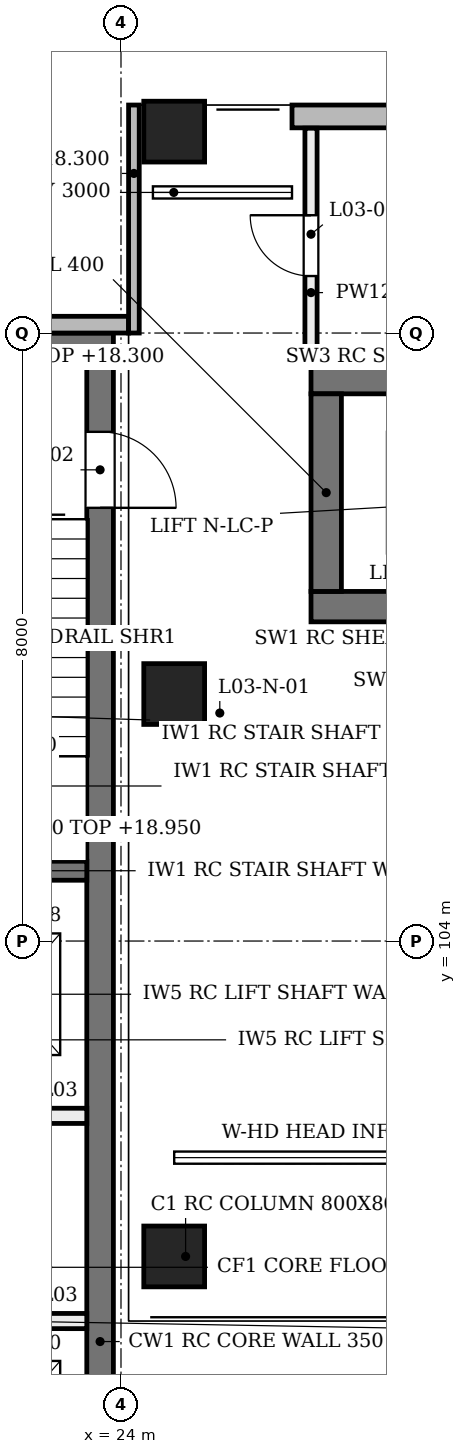
"""IFC4 building model, lengths in metres.
Left out: names, types, materials, properties, quantities, classifications, styles, units other than length and angle.
Written with IfcOpenShell. Run it as: python <this file> out.ifc"""

import sys

from ifc_helpers import new_model, si_unit, direction, frame, frame_2d, origin, origin_2d, place, context, subcontext, project, spatial, rectangle, extrude, element, fill, save


model = new_model("IFC4")
c1 = context("Model", 3, precision=1e-05, world=origin(), true_north=direction((0.0, 1.0)))
c2 = subcontext(c1, "Body", "Model", "MODEL_VIEW")
j1 = project(units=[si_unit("LENGTHUNIT", "METRE"), si_unit("PLANEANGLEUNIT", "RADIAN")], contexts=[c1])
p1 = place(None, origin())
s1 = spatial("IfcSite", under=j1, at=p1, CompositionType="ELEMENT")
p2 = place(p1, origin())
s2 = spatial("IfcBuilding", under=s1, at=p2, CompositionType="ELEMENT")
p3 = place(p2, frame((0.0, 0.0, 14.4)))
s3 = spatial("IfcBuildingStorey", under=s2, at=p3, CompositionType="ELEMENT", Elevation=14.4)
p4 = place(p3, frame((26.5, 108.4, 0.0), z_axis=(0.0, 0.0, 1.0), x_axis=(1.0, 0.0, 0.0)))
e1 = element("IfcWall", 1, at=p4, inside=s3, PredefinedType="SHEAR", context=c2, shape_type="SweptSolid", body=[
    extrude(rectangle(XDim=6.5, YDim=0.4, at=frame_2d((3.25, 0.0))), origin(), (0.0, 0.0, 1.0), 4.58),
])
p5 = place(p4, frame((1.15, 0.0, 0.0)))
e2 = element("IfcOpeningElement", 2, at=p5, cuts=e1, PredefinedType="OPENING", context=c2, shape_type="SweptSolid", body=[
    extrude(rectangle(XDim=1.1, YDim=2.1, at=frame_2d((0.55, 1.05))), frame((0.0, 0.21, 0.0), z_axis=(0.0, -1.0, 0.0), x_axis=(1.0, 0.0, 0.0)), (0.0, 0.0, 1.0), 0.42),
])
p6 = place(p4, frame((3.75, 0.0, 0.0)))
e3 = element("IfcOpeningElement", 3, at=p6, cuts=e1, PredefinedType="OPENING", context=c2, shape_type="SweptSolid", body=[
    extrude(rectangle(XDim=1.1, YDim=2.1, at=frame_2d((0.55, 1.05))), frame((0.0, 0.21, 0.0), z_axis=(0.0, -1.0, 0.0), x_axis=(1.0, 0.0, 0.0)), (0.0, 0.0, 1.0), 0.42),
])
p7 = place(p3, frame((26.5, 111.4, 0.0), z_axis=(0.0, 0.0, 1.0), x_axis=(1.0, 0.0, 0.0)))
e4 = element("IfcWall", 4, at=p7, inside=s3, PredefinedType="SHEAR", context=c2, shape_type="SweptSolid", body=[
    extrude(rectangle(XDim=6.5, YDim=0.4, at=frame_2d((3.25, 0.0))), origin(), (0.0, 0.0, 1.0), 4.58),
])
p8 = place(p3, frame((26.7, 108.6, 0.0), z_axis=(0.0, 0.0, 1.0), x_axis=(0.0, 1.0, 0.0)))
e5 = element("IfcWall", 5, at=p8, inside=s3, PredefinedType="SHEAR", context=c2, shape_type="SweptSolid", body=[
    extrude(rectangle(XDim=2.6, YDim=0.4, at=frame_2d((1.3, 0.0))), origin(), (0.0, 0.0, 1.0), 4.58),
])
p9 = place(p3, frame((15.95, 111.825, 0.0), z_axis=(0.0, 0.0, 1.0), x_axis=(1.0, 0.0, 0.0)))
e6 = element("IfcWall", 6, at=p9, inside=s3, PredefinedType="SHEAR", context=c2, shape_type="SweptSolid", body=[
    extrude(rectangle(XDim=7.95, YDim=0.35, at=frame_2d((3.975, 0.0))), origin(), (0.0, 0.0, 1.0), 4.58),
])
p10 = place(p3, frame((23.725, 96.45, 0.0), z_axis=(0.0, 0.0, 1.0), x_axis=(0.0, 1.0, 0.0)))
e7 = element("IfcWall", 7, at=p10, inside=s3, PredefinedType="SHEAR", context=c2, shape_type="SweptSolid", body=[
    extrude(rectangle(XDim=15.2, YDim=0.35, at=frame_2d((7.6, 0.0))), origin(), (0.0, 0.0, 1.0), 4.58),
])
p11 = place(p10, frame((13.25, 0.0, 0.0)))
e8 = element("IfcOpeningElement", 8, at=p11, cuts=e7, PredefinedType="OPENING", context=c2, shape_type="SweptSolid", body=[
    extrude(rectangle(XDim=1.0, YDim=2.1, at=frame_2d((0.5, 1.05))), frame((0.0, 0.185, 0.0), z_axis=(0.0, -1.0, 0.0), x_axis=(1.0, 0.0, 0.0)), (0.0, 0.0, 1.0), 0.37),
])
for number, where, z_axis, x_axis in (
    (9, (24.7, 99.6, 0.0), (0.0, 0.204, 0.979), (-1.0, 0.0, 0.0)),
    (10, (24.7, 107.0, 0.0), (0.0, 0.204, 0.979), (-1.0, 0.0, 0.0)),
    (11, (24.7, 114.4, 0.0), (0.0, 0.204, 0.979), (-1.0, 0.0, 0.0)),
):
    element("IfcColumn", number, at=place(p3, frame(where, z_axis=z_axis, x_axis=x_axis)), inside=s3, PredefinedType="COLUMN", context=c2, shape_type="SweptSolid", body=[
        extrude(rectangle(XDim=0.8, YDim=0.8, at=origin_2d()), origin(), (0.0, 0.0, 1.0), 4.903),
    ])
p12 = place(p3, frame((26.25, 114.85, 0.0), z_axis=(0.0, 0.0, 1.0), x_axis=(1.0, 0.0, 0.0)))
e12 = element("IfcWall", 12, at=p12, inside=s3, PredefinedType="SOLIDWALL", context=c2, shape_type="SweptSolid", body=[
    extrude(rectangle(XDim=20.0, YDim=0.3, at=frame_2d((10.0, 0.0))), origin(), (0.0, 0.0, 1.0), 3.9),
])
p13 = place(p3, frame((24.9, 101.15, 4.1), z_axis=(0.0, 0.0, 1.0), x_axis=(1.0, 0.0, 0.0)))
e13 = element("IfcWall", 13, at=p13, inside=s3, PredefinedType="SOLIDWALL", context=c2, shape_type="SweptSolid", body=[
    extrude(rectangle(XDim=6.9, YDim=0.15, at=frame_2d((3.45, 0.0))), origin(), (0.0, 0.0, 1.0), 0.48),
])
p14 = place(p3, frame((15.9, 112.11, 0.0), z_axis=(0.0, 0.0, 1.0), x_axis=(1.0, 0.0, 0.0)))
e14 = element("IfcWall", 14, at=p14, inside=s3, PredefinedType="SOLIDWALL", context=c2, shape_type="SweptSolid", body=[
    extrude(rectangle(XDim=8.2, YDim=0.22, at=frame_2d((4.1, 0.0))), origin(), (0.0, 0.0, 1.0), 3.9),
])
p15 = place(p14, frame((1.108, 0.0, 0.9)))
e15 = element("IfcOpeningElement", 15, at=p15, cuts=e14, PredefinedType="OPENING", context=c2, shape_type="SweptSolid", body=[
    extrude(rectangle(XDim=0.45, YDim=2.6, at=frame_2d((0.225, 1.3))), frame((0.0, 0.12, 0.0), z_axis=(0.0, -1.0, 0.0), x_axis=(1.0, 0.0, 0.0)), (0.0, 0.0, 1.0), 0.24),
])
p16 = place(p14, frame((3.775, 0.0, 0.9)))
e16 = element("IfcOpeningElement", 16, at=p16, cuts=e14, PredefinedType="OPENING", context=c2, shape_type="SweptSolid", body=[
    extrude(rectangle(XDim=0.45, YDim=2.6, at=frame_2d((0.225, 1.3))), frame((0.0, 0.12, 0.0), z_axis=(0.0, -1.0, 0.0), x_axis=(1.0, 0.0, 0.0)), (0.0, 0.0, 1.0), 0.24),
])
p17 = place(p14, frame((6.442, 0.0, 0.9)))
e17 = element("IfcOpeningElement", 17, at=p17, cuts=e14, PredefinedType="OPENING", context=c2, shape_type="SweptSolid", body=[
    extrude(rectangle(XDim=0.45, YDim=2.6, at=frame_2d((0.225, 1.3))), frame((0.0, 0.12, 0.0), z_axis=(0.0, -1.0, 0.0), x_axis=(1.0, 0.0, 0.0)), (0.0, 0.0, 1.0), 0.24),
])
p18 = place(p3, frame((24.17, 112.0, 0.0), z_axis=(0.0, 0.0, 1.0), x_axis=(0.0, 1.0, 0.0)))
e18 = element("IfcWall", 18, at=p18, inside=s3, PredefinedType="SOLIDWALL", context=c2, shape_type="SweptSolid", body=[
    extrude(rectangle(XDim=3.0, YDim=0.14, at=frame_2d((1.5, 0.0))), origin(), (0.0, 0.0, 1.0), 3.9),
])
p19 = place(p3, frame((20.45, 104.925, 0.0), z_axis=(0.0, 0.0, 1.0), x_axis=(1.0, 0.0, 0.0)))
e19 = element("IfcWall", 19, at=p19, inside=s3, PredefinedType="SOLIDWALL", context=c2, shape_type="SweptSolid", body=[
    extrude(rectangle(XDim=3.1, YDim=0.25, at=frame_2d((1.55, 0.0))), origin(), (0.0, 0.0, 1.0), 4.55),
])
p20 = place(p3, frame((16.35, 101.7, 0.0), z_axis=(0.0, 0.0, 1.0), x_axis=(1.0, 0.0, 0.0)))
e20 = element("IfcWall", 20, at=p20, inside=s3, PredefinedType="SOLIDWALL", context=c2, shape_type="SweptSolid", body=[
    extrude(rectangle(XDim=7.2, YDim=0.2, at=frame_2d((3.6, 0.0))), origin(), (0.0, 0.0, 1.0), 4.55),
])
p21 = place(p20, frame((0.5, 0.0, 0.0)))
e21 = element("IfcOpeningElement", 21, at=p21, cuts=e20, PredefinedType="OPENING", context=c2, shape_type="SweptSolid", body=[
    extrude(rectangle(XDim=1.1, YDim=2.1, at=frame_2d((0.55, 1.05))), frame((0.0, 0.11, 0.0), z_axis=(0.0, -1.0, 0.0), x_axis=(1.0, 0.0, 0.0)), (0.0, 0.0, 1.0), 0.22),
])
p22 = place(p20, frame((5.6, 0.0, 0.0)))
e22 = element("IfcOpeningElement", 22, at=p22, cuts=e20, PredefinedType="OPENING", context=c2, shape_type="SweptSolid", body=[
    extrude(rectangle(XDim=1.1, YDim=2.1, at=frame_2d((0.55, 1.05))), frame((0.0, 0.11, 0.0), z_axis=(0.0, -1.0, 0.0), x_axis=(1.0, 0.0, 0.0)), (0.0, 0.0, 1.0), 0.22),
])
p23 = place(p20, frame((3.1, 0.0, 0.0)))
e23 = element("IfcOpeningElement", 23, at=p23, cuts=e20, PredefinedType="OPENING", context=c2, shape_type="SweptSolid", body=[
    extrude(rectangle(XDim=1.0, YDim=2.1, at=frame_2d((0.5, 1.05))), frame((0.0, 0.11, 0.0), z_axis=(0.0, -1.0, 0.0), x_axis=(1.0, 0.0, 0.0)), (0.0, 0.0, 1.0), 0.22),
])
p24 = place(p3, frame((16.35, 99.0, 0.0), z_axis=(0.0, 0.0, 1.0), x_axis=(1.0, 0.0, 0.0)))
e24 = element("IfcWall", 24, at=p24, inside=s3, PredefinedType="SOLIDWALL", context=c2, shape_type="SweptSolid", body=[
    extrude(rectangle(XDim=7.2, YDim=0.2, at=frame_2d((3.6, 0.0))), origin(), (0.0, 0.0, 1.0), 4.55),
])
p25 = place(p24, frame((0.5, 0.0, 0.0)))
e25 = element("IfcOpeningElement", 25, at=p25, cuts=e24, PredefinedType="OPENING", context=c2, shape_type="SweptSolid", body=[
    extrude(rectangle(XDim=1.1, YDim=2.1, at=frame_2d((0.55, 1.05))), frame((0.0, 0.11, 0.0), z_axis=(0.0, -1.0, 0.0), x_axis=(1.0, 0.0, 0.0)), (0.0, 0.0, 1.0), 0.22),
])
p26 = place(p24, frame((5.6, 0.0, 0.0)))
e26 = element("IfcOpeningElement", 26, at=p26, cuts=e24, PredefinedType="OPENING", context=c2, shape_type="SweptSolid", body=[
    extrude(rectangle(XDim=1.1, YDim=2.1, at=frame_2d((0.55, 1.05))), frame((0.0, 0.11, 0.0), z_axis=(0.0, -1.0, 0.0), x_axis=(1.0, 0.0, 0.0)), (0.0, 0.0, 1.0), 0.22),
])
p27 = place(p24, frame((3.1, 0.0, 0.0)))
e27 = element("IfcOpeningElement", 27, at=p27, cuts=e24, PredefinedType="OPENING", context=c2, shape_type="SweptSolid", body=[
    extrude(rectangle(XDim=1.0, YDim=2.1, at=frame_2d((0.5, 1.05))), frame((0.0, 0.11, 0.0), z_axis=(0.0, -1.0, 0.0), x_axis=(1.0, 0.0, 0.0)), (0.0, 0.0, 1.0), 0.22),
])
p28 = place(p3, frame((26.5, 111.605, 0.0), z_axis=(0.0, 0.0, 1.0), x_axis=(0.0, 1.0, 0.0)))
e28 = element("IfcWall", 28, at=p28, inside=s3, PredefinedType="PARTITIONING", context=c2, shape_type="SweptSolid", body=[
    extrude(rectangle(XDim=3.09, YDim=0.16, at=frame_2d((1.545, 0.0))), origin(), (0.0, 0.0, 1.0), 4.56),
])
p29 = place(p28, frame((1.145, 0.0, 0.0)))
e29 = element("IfcOpeningElement", 29, at=p29, cuts=e28, PredefinedType="OPENING", context=c2, shape_type="SweptSolid", body=[
    extrude(rectangle(XDim=0.8, YDim=2.1, at=frame_2d((0.4, 1.05))), frame((0.0, 0.09, 0.0), z_axis=(0.0, -1.0, 0.0), x_axis=(1.0, 0.0, 0.0)), (0.0, 0.0, 1.0), 0.18),
])
p30 = place(p11, frame((1.0, 0.0, 0.0), z_axis=(0.0, 0.0, 1.0), x_axis=(-1.0, 0.0, 0.0)))
e30 = element("IfcDoor", 30, at=p30, inside=s3, OperationType="SINGLE_SWING_LEFT", PredefinedType="DOOR", context=c2, shape_type="SweptSolid", body=[
    extrude(rectangle(XDim=1.0, YDim=2.1, at=frame_2d((0.5, 1.05))), frame((0.0, 0.025, 0.0), z_axis=(0.0, -1.0, 0.0), x_axis=(1.0, 0.0, 0.0)), (0.0, 0.0, 1.0), 0.05),
])
fill(e8, e30)
p31 = place(p29, frame((0.8, 0.0, 0.0), z_axis=(0.0, 0.0, 1.0), x_axis=(-1.0, 0.0, 0.0)))
e31 = element("IfcDoor", 31, at=p31, inside=s3, OperationType="SINGLE_SWING_RIGHT", PredefinedType="DOOR", context=c2, shape_type="SweptSolid", body=[
    extrude(rectangle(XDim=0.8, YDim=2.1, at=frame_2d((0.4, 1.05))), frame((0.0, 0.025, 0.0), z_axis=(0.0, -1.0, 0.0), x_axis=(1.0, 0.0, 0.0)), (0.0, 0.0, 1.0), 0.05),
])
fill(e29, e31)
save(model, sys.argv[1])
